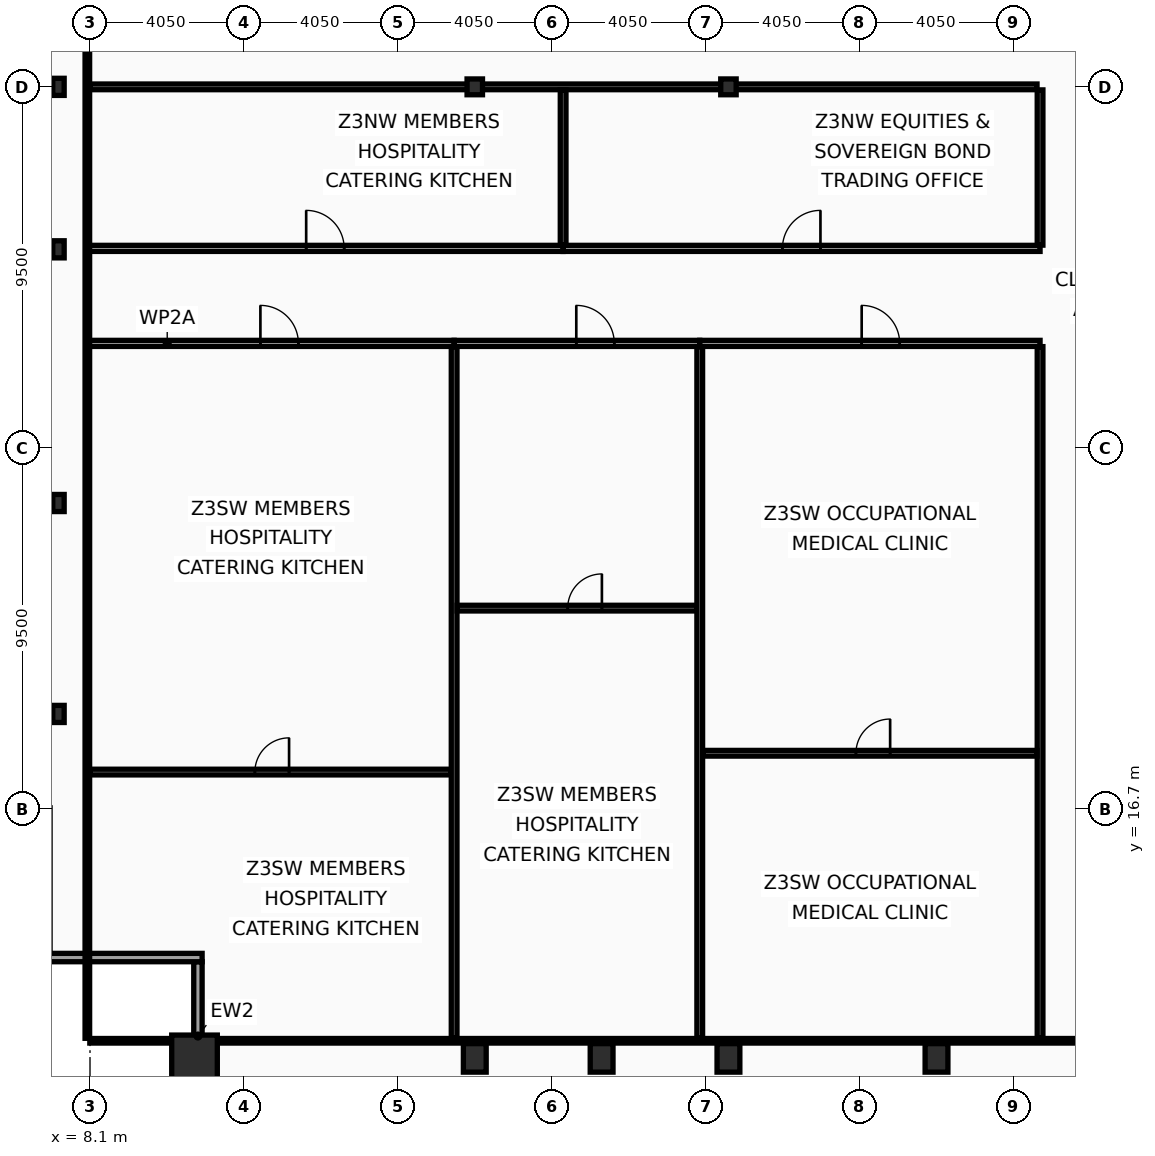
"""IFC4 building model, lengths in metres.
Left out: names, types, materials, properties, quantities, classifications, styles, units other than length and angle.
Written with IfcOpenShell. Run it as: python <this file> out.ifc"""

import sys

from ifc_helpers import new_model, si_unit, direction, frame, frame_2d, origin, origin_2d, place, context, subcontext, project, spatial, rectangle, hollow_rectangle, i_section, extrude, element, fill, save


model = new_model("IFC4")
c1 = context("Model", 3, precision=1e-05, world=origin(), true_north=direction((0.0, 1.0)))
c2 = subcontext(c1, "Body", "Model", "MODEL_VIEW")
j1 = project(units=[si_unit("LENGTHUNIT", "METRE"), si_unit("PLANEANGLEUNIT", "RADIAN")], contexts=[c1])
p1 = place(None, origin())
s1 = spatial("IfcSite", under=j1, at=p1, CompositionType="ELEMENT")
p2 = place(p1, origin())
s2 = spatial("IfcBuilding", under=s1, at=p2, CompositionType="ELEMENT")
p3 = place(p2, frame((0.0, 0.0, 213.8)))
s3 = spatial("IfcBuildingStorey", under=s2, at=p3, CompositionType="ELEMENT", Elevation=213.8)
p4 = place(p3, frame((10.85, 10.15, 0.0), z_axis=(0.0, 0.0, 1.0), x_axis=(1.0, 0.0, 0.0)))
e1 = element("IfcColumn", 1, at=p4, inside=s3, PredefinedType="COLUMN", context=c2, shape_type="SweptSolid", body=[
    extrude(hollow_rectangle(XDim=1.2, YDim=1.2, WallThickness=0.06, at=origin_2d()), origin(), (0.0, 0.0, 1.0), 3.6),
])
for number, where, z_axis, x_axis in (
    (2, (18.225, 10.15, 0.0), (0.0, 0.0, 1.0), (1.0, 0.0, 0.0)),
    (3, (21.562, 10.15, 0.0), (0.0, 0.0, 1.0), (1.0, 0.0, 0.0)),
    (4, (24.9, 10.15, 0.0), (0.0, 0.0, 1.0), (1.0, 0.0, 0.0)),
    (5, (30.375, 10.15, 0.0), (0.0, 0.0, 1.0), (1.0, 0.0, 0.0)),
):
    element("IfcColumn", number, at=place(p3, frame(where, z_axis=z_axis, x_axis=x_axis)), inside=s3, PredefinedType="COLUMN", context=c2, shape_type="SweptSolid", body=[
        extrude(hollow_rectangle(XDim=0.6, YDim=0.75, WallThickness=0.045, at=origin_2d()), origin(), (0.0, 0.0, 1.0), 3.6),
    ])
for number, where, z_axis, x_axis in (
    (6, (7.27, 19.2, 0.0), (0.0, 0.0, 1.0), (1.0, 0.0, 0.0)),
    (7, (7.27, 24.75, 0.0), (0.0, 0.0, 1.0), (1.0, 0.0, 0.0)),
    (8, (7.27, 31.425, 0.0), (0.0, 0.0, 1.0), (1.0, 0.0, 0.0)),
    (9, (7.27, 35.7, 0.0), (0.0, 0.0, 1.0), (1.0, 0.0, 0.0)),
):
    element("IfcColumn", number, at=place(p3, frame(where, z_axis=z_axis, x_axis=x_axis)), inside=s3, PredefinedType="COLUMN", context=c2, shape_type="SweptSolid", body=[
        extrude(i_section(OverallWidth=0.3, OverallDepth=0.45, WebThickness=0.014, FlangeThickness=0.026, at=origin_2d()), origin(), (0.0, 0.0, 1.0), 3.6),
    ])
for number, where, z_axis, x_axis in (
    (10, (18.225, 35.7, 0.0), (0.0, 0.0, 1.0), (1.0, 0.0, 0.0)),
    (11, (24.9, 35.7, 0.0), (0.0, 0.0, 1.0), (1.0, 0.0, 0.0)),
):
    element("IfcColumn", number, at=place(p3, frame(where, z_axis=z_axis, x_axis=x_axis)), inside=s3, PredefinedType="COLUMN", context=c2, shape_type="SweptSolid", body=[
        extrude(i_section(OverallWidth=0.406, OverallDepth=0.416, WebThickness=0.03, FlangeThickness=0.048, at=origin_2d()), origin(), (0.0, 0.0, 1.0), 3.6),
    ])
p5 = place(p3, frame((10.94, 8.77, 0.0), z_axis=(0.0, 0.0, 1.0), x_axis=(0.0, 1.0, 0.0)))
e12 = element("IfcWall", 12, at=p5, inside=s3, PredefinedType="SOLIDWALL", context=c2, shape_type="SweptSolid", body=[
    extrude(rectangle(XDim=3.91, YDim=0.22, at=frame_2d((1.955, 0.0))), origin(), (0.0, 0.0, 1.0), 2.83),
])
p6 = place(p3, frame((11.05, 12.79, 0.0), z_axis=(0.0, 0.0, 1.0), x_axis=(-1.0, 0.0, 0.0)))
e13 = element("IfcWall", 13, at=p6, inside=s3, PredefinedType="SOLIDWALL", context=c2, shape_type="SweptSolid", body=[
    extrude(rectangle(XDim=4.22, YDim=0.22, at=frame_2d((2.11, 0.0))), origin(), (0.0, 0.0, 1.0), 2.83),
])
p7 = place(p3, frame((33.1, 10.665, 0.0), z_axis=(0.0, 0.0, 1.0), x_axis=(0.0, 1.0, 0.0)))
e14 = element("IfcWall", 14, at=p7, inside=s3, PredefinedType="PARTITIONING", context=c2, shape_type="SweptSolid", body=[
    extrude(rectangle(XDim=18.2, YDim=0.15, at=frame_2d((9.1, 0.0))), origin(), (0.0, 0.0, 1.0), 2.98),
])
p8 = place(p3, frame((33.1, 31.535, 0.0), z_axis=(0.0, 0.0, 1.0), x_axis=(0.0, 1.0, 0.0)))
e15 = element("IfcWall", 15, at=p8, inside=s3, PredefinedType="PARTITIONING", context=c2, shape_type="SweptSolid", body=[
    extrude(rectangle(XDim=4.085, YDim=0.15, at=frame_2d((2.042, 0.0))), origin(), (0.0, 0.0, 1.0), 2.98),
])
p9 = place(p3, frame((8.095, 35.7, 0.0), z_axis=(0.0, 0.0, 1.0), x_axis=(1.0, 0.0, 0.0)))
e16 = element("IfcWall", 16, at=p9, inside=s3, PredefinedType="PARTITIONING", context=c2, shape_type="SweptSolid", body=[
    extrude(rectangle(XDim=24.925, YDim=0.15, at=frame_2d((12.462, 0.0))), origin(), (0.0, 0.0, 1.0), 2.73),
])
p10 = place(p3, frame((8.03, 28.95, 0.0), z_axis=(0.0, 0.0, 1.0), x_axis=(1.0, 0.0, 0.0)))
e17 = element("IfcWall", 17, at=p10, inside=s3, PredefinedType="PARTITIONING", context=c2, shape_type="SweptSolid", body=[
    extrude(rectangle(XDim=9.652, YDim=0.16, at=frame_2d((4.826, 0.0))), origin(), (0.0, 0.0, 1.0), 3.44),
])
p11 = place(p10, frame((4.554, 0.0, 0.0)))
e18 = element("IfcOpeningElement", 18, at=p11, cuts=e17, PredefinedType="OPENING", context=c2, shape_type="SweptSolid", body=[
    extrude(rectangle(XDim=1.0, YDim=2.05, at=frame_2d((0.5, 1.025))), frame((0.0, 0.09, 0.0), z_axis=(0.0, -1.0, 0.0), x_axis=(1.0, 0.0, 0.0)), (0.0, 0.0, 1.0), 0.18),
])
p12 = place(p3, frame((8.095, 17.671, 0.0), z_axis=(0.0, 0.0, 1.0), x_axis=(1.0, 0.0, 0.0)))
e19 = element("IfcWall", 19, at=p12, inside=s3, PredefinedType="PARTITIONING", context=c2, shape_type="SweptSolid", body=[
    extrude(rectangle(XDim=9.507, YDim=0.15, at=frame_2d((4.753, 0.0))), origin(), (0.0, 0.0, 1.0), 2.83),
])
p13 = place(p12, frame((4.343, 0.0, 0.0)))
e20 = element("IfcOpeningElement", 20, at=p13, cuts=e19, PredefinedType="OPENING", context=c2, shape_type="SweptSolid", body=[
    extrude(rectangle(XDim=0.9, YDim=2.05, at=frame_2d((0.45, 1.025))), frame((0.0, 0.085, 0.0), z_axis=(0.0, -1.0, 0.0), x_axis=(1.0, 0.0, 0.0)), (0.0, 0.0, 1.0), 0.17),
])
p14 = place(p3, frame((17.682, 28.95, 0.0), z_axis=(0.0, 0.0, 1.0), x_axis=(1.0, 0.0, 0.0)))
e21 = element("IfcWall", 21, at=p14, inside=s3, PredefinedType="PARTITIONING", context=c2, shape_type="SweptSolid", body=[
    extrude(rectangle(XDim=6.463, YDim=0.16, at=frame_2d((3.232, 0.0))), origin(), (0.0, 0.0, 1.0), 2.73),
])
p15 = place(p14, frame((3.215, 0.0, 0.0)))
e22 = element("IfcOpeningElement", 22, at=p15, cuts=e21, PredefinedType="OPENING", context=c2, shape_type="SweptSolid", body=[
    extrude(rectangle(XDim=1.0, YDim=2.05, at=frame_2d((0.5, 1.025))), frame((0.0, 0.09, 0.0), z_axis=(0.0, -1.0, 0.0), x_axis=(1.0, 0.0, 0.0)), (0.0, 0.0, 1.0), 0.18),
])
p16 = place(p3, frame((17.682, 10.665, 0.0), z_axis=(0.0, 0.0, 1.0), x_axis=(0.0, 1.0, 0.0)))
e23 = element("IfcWall", 23, at=p16, inside=s3, PredefinedType="PARTITIONING", context=c2, shape_type="SweptSolid", body=[
    extrude(rectangle(XDim=18.2, YDim=0.15, at=frame_2d((9.1, 0.0))), origin(), (0.0, 0.0, 1.0), 2.73),
])
p17 = place(p3, frame((17.762, 21.984, 0.0), z_axis=(0.0, 0.0, 1.0), x_axis=(1.0, 0.0, 0.0)))
e24 = element("IfcWall", 24, at=p17, inside=s3, PredefinedType="PARTITIONING", context=c2, shape_type="SweptSolid", body=[
    extrude(rectangle(XDim=6.303, YDim=0.15, at=frame_2d((3.152, 0.0))), origin(), (0.0, 0.0, 1.0), 2.73),
])
p18 = place(p17, frame((2.908, 0.0, 0.0)))
e25 = element("IfcOpeningElement", 25, at=p18, cuts=e24, PredefinedType="OPENING", context=c2, shape_type="SweptSolid", body=[
    extrude(rectangle(XDim=0.9, YDim=2.05, at=frame_2d((0.45, 1.025))), frame((0.0, 0.085, 0.0), z_axis=(0.0, -1.0, 0.0), x_axis=(1.0, 0.0, 0.0)), (0.0, 0.0, 1.0), 0.17),
])
p19 = place(p3, frame((24.145, 28.95, 0.0), z_axis=(0.0, 0.0, 1.0), x_axis=(1.0, 0.0, 0.0)))
e26 = element("IfcWall", 26, at=p19, inside=s3, PredefinedType="PARTITIONING", context=c2, shape_type="SweptSolid", body=[
    extrude(rectangle(XDim=8.955, YDim=0.16, at=frame_2d((4.478, 0.0))), origin(), (0.0, 0.0, 1.0), 2.73),
])
p20 = place(p19, frame((4.261, 0.0, 0.0)))
e27 = element("IfcOpeningElement", 27, at=p20, cuts=e26, PredefinedType="OPENING", context=c2, shape_type="SweptSolid", body=[
    extrude(rectangle(XDim=1.0, YDim=2.05, at=frame_2d((0.5, 1.025))), frame((0.0, 0.09, 0.0), z_axis=(0.0, -1.0, 0.0), x_axis=(1.0, 0.0, 0.0)), (0.0, 0.0, 1.0), 0.18),
])
p21 = place(p3, frame((24.145, 10.665, 0.0), z_axis=(0.0, 0.0, 1.0), x_axis=(0.0, 1.0, 0.0)))
e28 = element("IfcWall", 28, at=p21, inside=s3, PredefinedType="PARTITIONING", context=c2, shape_type="SweptSolid", body=[
    extrude(rectangle(XDim=18.2, YDim=0.15, at=frame_2d((9.1, 0.0))), origin(), (0.0, 0.0, 1.0), 2.98),
])
p22 = place(p3, frame((24.225, 18.166, 0.0), z_axis=(0.0, 0.0, 1.0), x_axis=(1.0, 0.0, 0.0)))
e29 = element("IfcWall", 29, at=p22, inside=s3, PredefinedType="PARTITIONING", context=c2, shape_type="SweptSolid", body=[
    extrude(rectangle(XDim=8.795, YDim=0.15, at=frame_2d((4.397, 0.0))), origin(), (0.0, 0.0, 1.0), 2.73),
])
p23 = place(p22, frame((4.03, 0.0, 0.0)))
e30 = element("IfcOpeningElement", 30, at=p23, cuts=e29, PredefinedType="OPENING", context=c2, shape_type="SweptSolid", body=[
    extrude(rectangle(XDim=0.9, YDim=2.05, at=frame_2d((0.45, 1.025))), frame((0.0, 0.085, 0.0), z_axis=(0.0, -1.0, 0.0), x_axis=(1.0, 0.0, 0.0)), (0.0, 0.0, 1.0), 0.17),
])
p24 = place(p3, frame((8.03, 31.45, 0.0), z_axis=(0.0, 0.0, 1.0), x_axis=(1.0, 0.0, 0.0)))
e31 = element("IfcWall", 31, at=p24, inside=s3, PredefinedType="PARTITIONING", context=c2, shape_type="SweptSolid", body=[
    extrude(rectangle(XDim=12.52, YDim=0.16, at=frame_2d((6.26, 0.0))), origin(), (0.0, 0.0, 1.0), 2.73),
])
p25 = place(p24, frame((5.758, 0.0, 0.0)))
e32 = element("IfcOpeningElement", 32, at=p25, cuts=e31, PredefinedType="OPENING", context=c2, shape_type="SweptSolid", body=[
    extrude(rectangle(XDim=1.0, YDim=2.05, at=frame_2d((0.5, 1.025))), frame((0.0, 0.09, 0.0), z_axis=(0.0, -1.0, 0.0), x_axis=(1.0, 0.0, 0.0)), (0.0, 0.0, 1.0), 0.18),
])
p26 = place(p3, frame((20.55, 31.45, 0.0), z_axis=(0.0, 0.0, 1.0), x_axis=(1.0, 0.0, 0.0)))
e33 = element("IfcWall", 33, at=p26, inside=s3, PredefinedType="PARTITIONING", context=c2, shape_type="SweptSolid", body=[
    extrude(rectangle(XDim=12.55, YDim=0.16, at=frame_2d((6.275, 0.0))), origin(), (0.0, 0.0, 1.0), 2.73),
])
p27 = place(p26, frame((5.771, 0.0, 0.0)))
e34 = element("IfcOpeningElement", 34, at=p27, cuts=e33, PredefinedType="OPENING", context=c2, shape_type="SweptSolid", body=[
    extrude(rectangle(XDim=1.0, YDim=2.05, at=frame_2d((0.5, 1.025))), frame((0.0, 0.09, 0.0), z_axis=(0.0, -1.0, 0.0), x_axis=(1.0, 0.0, 0.0)), (0.0, 0.0, 1.0), 0.18),
])
p28 = place(p3, frame((20.55, 31.535, 0.0), z_axis=(0.0, 0.0, 1.0), x_axis=(0.0, 1.0, 0.0)))
e35 = element("IfcWall", 35, at=p28, inside=s3, PredefinedType="PARTITIONING", context=c2, shape_type="SweptSolid", body=[
    extrude(rectangle(XDim=4.085, YDim=0.15, at=frame_2d((2.042, 0.0))), origin(), (0.0, 0.0, 1.0), 2.98),
])
p29 = place(p3, frame((8.03, 10.665, 0.0), z_axis=(0.0, 0.0, 1.0), x_axis=(0.0, 1.0, 0.0)))
e36 = element("IfcWall", 36, at=p29, inside=s3, PredefinedType="PARTITIONING", context=c2, shape_type="SweptSolid", body=[
    extrude(rectangle(XDim=42.11, YDim=0.12, at=frame_2d((21.055, 0.0))), origin(), (0.0, 0.0, 1.0), 2.73),
])
p30 = place(p3, frame((8.095, 10.6, 0.0), z_axis=(0.0, 0.0, 1.0), x_axis=(1.0, 0.0, 0.0)))
e37 = element("IfcWall", 37, at=p30, inside=s3, PredefinedType="PARTITIONING", context=c2, shape_type="SweptSolid", body=[
    extrude(rectangle(XDim=56.71, YDim=0.12, at=frame_2d((28.355, 0.0))), origin(), (0.0, 0.0, 1.0), 2.73),
])
p31 = place(p11, origin())
e38 = element("IfcDoor", 38, at=p31, inside=s3, OperationType="SINGLE_SWING_LEFT", PredefinedType="DOOR", context=c2, shape_type="SweptSolid", body=[
    extrude(rectangle(XDim=1.0, YDim=2.05, at=frame_2d((0.5, 1.025))), frame((0.0, 0.025, 0.0), z_axis=(0.0, -1.0, 0.0), x_axis=(1.0, 0.0, 0.0)), (0.0, 0.0, 1.0), 0.05),
])
fill(e18, e38)
p32 = place(p13, origin())
e39 = element("IfcDoor", 39, at=p32, inside=s3, OperationType="SINGLE_SWING_RIGHT", PredefinedType="DOOR", context=c2, shape_type="SweptSolid", body=[
    extrude(rectangle(XDim=0.9, YDim=2.05, at=frame_2d((0.45, 1.025))), frame((0.0, 0.025, 0.0), z_axis=(0.0, -1.0, 0.0), x_axis=(1.0, 0.0, 0.0)), (0.0, 0.0, 1.0), 0.05),
])
fill(e20, e39)
p33 = place(p15, origin())
e40 = element("IfcDoor", 40, at=p33, inside=s3, OperationType="SINGLE_SWING_LEFT", PredefinedType="DOOR", context=c2, shape_type="SweptSolid", body=[
    extrude(rectangle(XDim=1.0, YDim=2.05, at=frame_2d((0.5, 1.025))), frame((0.0, 0.025, 0.0), z_axis=(0.0, -1.0, 0.0), x_axis=(1.0, 0.0, 0.0)), (0.0, 0.0, 1.0), 0.05),
])
fill(e22, e40)
p34 = place(p18, origin())
e41 = element("IfcDoor", 41, at=p34, inside=s3, OperationType="SINGLE_SWING_RIGHT", PredefinedType="DOOR", context=c2, shape_type="SweptSolid", body=[
    extrude(rectangle(XDim=0.9, YDim=2.05, at=frame_2d((0.45, 1.025))), frame((0.0, 0.025, 0.0), z_axis=(0.0, -1.0, 0.0), x_axis=(1.0, 0.0, 0.0)), (0.0, 0.0, 1.0), 0.05),
])
fill(e25, e41)
p35 = place(p20, origin())
e42 = element("IfcDoor", 42, at=p35, inside=s3, OperationType="SINGLE_SWING_LEFT", PredefinedType="DOOR", context=c2, shape_type="SweptSolid", body=[
    extrude(rectangle(XDim=1.0, YDim=2.05, at=frame_2d((0.5, 1.025))), frame((0.0, 0.025, 0.0), z_axis=(0.0, -1.0, 0.0), x_axis=(1.0, 0.0, 0.0)), (0.0, 0.0, 1.0), 0.05),
])
fill(e27, e42)
p36 = place(p23, origin())
e43 = element("IfcDoor", 43, at=p36, inside=s3, OperationType="SINGLE_SWING_RIGHT", PredefinedType="DOOR", context=c2, shape_type="SweptSolid", body=[
    extrude(rectangle(XDim=0.9, YDim=2.05, at=frame_2d((0.45, 1.025))), frame((0.0, 0.025, 0.0), z_axis=(0.0, -1.0, 0.0), x_axis=(1.0, 0.0, 0.0)), (0.0, 0.0, 1.0), 0.05),
])
fill(e30, e43)
p37 = place(p25, origin())
e44 = element("IfcDoor", 44, at=p37, inside=s3, OperationType="SINGLE_SWING_LEFT", PredefinedType="DOOR", context=c2, shape_type="SweptSolid", body=[
    extrude(rectangle(XDim=1.0, YDim=2.05, at=frame_2d((0.5, 1.025))), frame((0.0, 0.025, 0.0), z_axis=(0.0, -1.0, 0.0), x_axis=(1.0, 0.0, 0.0)), (0.0, 0.0, 1.0), 0.05),
])
fill(e32, e44)
p38 = place(p27, origin())
e45 = element("IfcDoor", 45, at=p38, inside=s3, OperationType="SINGLE_SWING_RIGHT", PredefinedType="DOOR", context=c2, shape_type="SweptSolid", body=[
    extrude(rectangle(XDim=1.0, YDim=2.05, at=frame_2d((0.5, 1.025))), frame((0.0, 0.025, 0.0), z_axis=(0.0, -1.0, 0.0), x_axis=(1.0, 0.0, 0.0)), (0.0, 0.0, 1.0), 0.05),
])
fill(e34, e45)
save(model, sys.argv[1])
